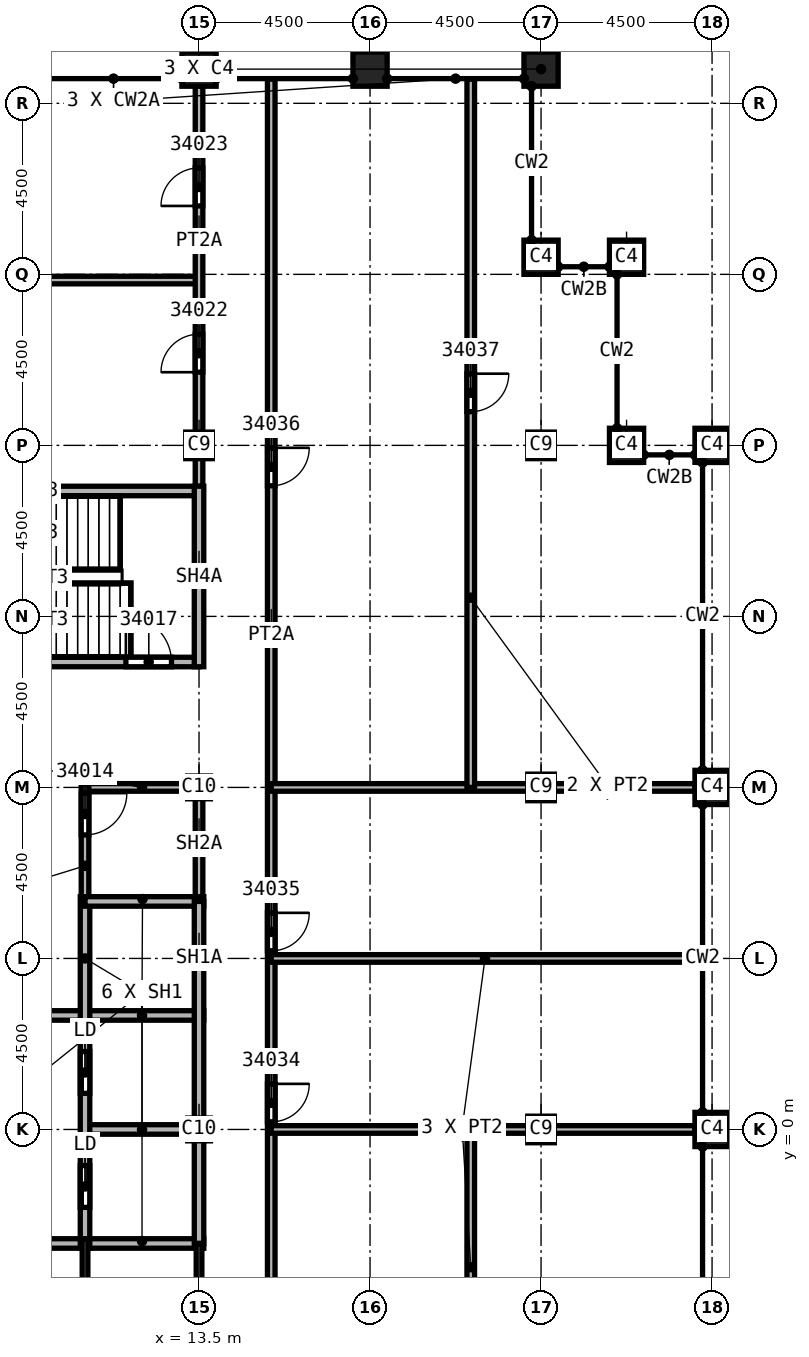
"""IFC4 building model, lengths in metres.
Left out: names, types, materials, properties, quantities, classifications, styles, units other than length and angle.
Written with IfcOpenShell. Run it as: python <this file> out.ifc"""

import sys

from ifc_helpers import new_model, si_unit, direction, frame, frame_2d, origin, origin_2d, place, context, subcontext, project, spatial, rectangle, extrude, element, fill, save


model = new_model("IFC4")
c1 = context("Model", 3, precision=1e-05, world=origin(), true_north=direction((0.0, 1.0)))
c2 = subcontext(c1, "Body", "Model", "MODEL_VIEW")
j1 = project(units=[si_unit("LENGTHUNIT", "METRE"), si_unit("PLANEANGLEUNIT", "RADIAN")], contexts=[c1])
p1 = place(None, origin())
s1 = spatial("IfcSite", under=j1, at=p1, CompositionType="ELEMENT")
p2 = place(p1, origin())
s2 = spatial("IfcBuilding", under=s1, at=p2, CompositionType="ELEMENT")
p3 = place(p2, frame((0.0, 0.0, 366.0)))
s3 = spatial("IfcBuildingStorey", under=s2, at=p3, CompositionType="ELEMENT", Elevation=366.0)
for number, where, z_axis, x_axis in (
    (1, (13.5, 18.0, 0.0), (0.0, 0.0, 1.0), (1.0, 0.0, 0.0)),
    (2, (22.5, 0.0, 0.0), (0.0, 0.0, 1.0), (1.0, 0.0, 0.0)),
    (3, (22.5, 9.0, 0.0), (0.0, 0.0, 1.0), (1.0, 0.0, 0.0)),
    (4, (22.5, 18.0, 0.0), (0.0, 0.0, 1.0), (1.0, 0.0, 0.0)),
):
    element("IfcColumn", number, at=place(p3, frame(where, z_axis=z_axis, x_axis=x_axis)), inside=s3, PredefinedType="COLUMN", context=c2, shape_type="SweptSolid", body=[
        extrude(rectangle(XDim=0.7, YDim=0.7, at=origin_2d()), origin(), (0.0, 0.0, 1.0), 9.6),
    ])
for number, where, z_axis, x_axis in (
    (5, (13.5, 0.0, 0.0), (0.0, 0.0, 1.0), (1.0, 0.0, 0.0)),
    (6, (13.5, 9.0, 0.0), (0.0, 0.0, 1.0), (1.0, 0.0, 0.0)),
):
    element("IfcColumn", number, at=place(p3, frame(where, z_axis=z_axis, x_axis=x_axis)), inside=s3, PredefinedType="COLUMN", context=c2, shape_type="SweptSolid", body=[
        extrude(rectangle(XDim=0.6, YDim=0.6, at=origin_2d()), origin(), (0.0, 0.0, 1.0), 9.6),
    ])
for number, where, z_axis, x_axis in (
    (7, (27.0, 0.0, 0.0), (0.0, 0.0, 1.0), (0.0, 1.0, 0.0)),
    (8, (27.0, 9.0, 0.0), (0.0, 0.0, 1.0), (0.0, 1.0, 0.0)),
    (9, (27.0, 18.0, 0.0), (0.0, 0.0, 1.0), (0.0, 1.0, 0.0)),
    (10, (13.5, 27.9, 0.0), (0.0, 0.0, 1.0), (1.0, 0.0, 0.0)),
    (11, (18.0, 27.9, 0.0), (0.0, 0.0, 1.0), (1.0, 0.0, 0.0)),
    (12, (22.5, 27.9, 0.0), (0.0, 0.0, 1.0), (1.0, 0.0, 0.0)),
    (13, (22.5, 22.95, 0.0), (0.0, 0.0, 1.0), (1.0, 0.0, 0.0)),
    (14, (24.75, 22.95, 0.0), (0.0, 0.0, 1.0), (1.0, 0.0, 0.0)),
    (15, (24.75, 18.0, 0.0), (0.0, 0.0, 1.0), (1.0, 0.0, 0.0)),
):
    element("IfcColumn", number, at=place(p3, frame(where, z_axis=z_axis, x_axis=x_axis)), inside=s3, PredefinedType="COLUMN", context=c2, shape_type="SweptSolid", body=[
        extrude(rectangle(XDim=0.9, YDim=0.9, at=origin_2d()), origin(), (0.0, 0.0, 1.0), 9.6),
    ])
p4 = place(p3, frame((3.0, 22.35, 0.0), z_axis=(0.0, 0.0, 1.0), x_axis=(1.0, 0.0, 0.0)))
e16 = element("IfcWall", 16, at=p4, inside=s3, PredefinedType="PARTITIONING", context=c2, shape_type="SweptSolid", body=[
    extrude(rectangle(XDim=10.5, YDim=0.2, at=frame_2d((5.25, 0.0))), origin(), (0.0, 0.0, 1.0), 9.15),
])
p5 = place(p3, frame((13.5, 16.675, 0.0), z_axis=(0.0, 0.0, 1.0), x_axis=(0.0, 1.0, 0.0)))
e17 = element("IfcWall", 17, at=p5, inside=s3, PredefinedType="PARTITIONING", context=c2, shape_type="SweptSolid", body=[
    extrude(rectangle(XDim=10.775, YDim=0.2, at=frame_2d((5.387, 0.0))), origin(), (0.0, 0.0, 1.0), 5.76),
])
p6 = place(p5, frame((3.25, 0.0, 0.0)))
e18 = element("IfcOpeningElement", 18, at=p6, cuts=e17, PredefinedType="OPENING", context=c2, shape_type="SweptSolid", body=[
    extrude(rectangle(XDim=1.0, YDim=2.1, at=frame_2d((0.5, 1.05))), frame((0.0, 0.1, 0.0), z_axis=(0.0, -1.0, 0.0), x_axis=(1.0, 0.0, 0.0)), (0.0, 0.0, 1.0), 0.2),
])
p7 = place(p5, frame((7.625, 0.0, 0.0)))
e19 = element("IfcOpeningElement", 19, at=p7, cuts=e17, PredefinedType="OPENING", context=c2, shape_type="SweptSolid", body=[
    extrude(rectangle(XDim=1.0, YDim=2.1, at=frame_2d((0.5, 1.05))), frame((0.0, 0.1, 0.0), z_axis=(0.0, -1.0, 0.0), x_axis=(1.0, 0.0, 0.0)), (0.0, 0.0, 1.0), 0.2),
])
p8 = place(p3, frame((15.4, 27.636, 0.0), z_axis=(0.0, 0.0, 1.0), x_axis=(0.0, -1.0, 0.0)))
e20 = element("IfcWall", 20, at=p8, inside=s3, PredefinedType="PARTITIONING", context=c2, shape_type="SweptSolid", body=[
    extrude(rectangle(XDim=55.086, YDim=0.2, at=frame_2d((27.543, 0.0))), origin(), (0.0, 0.0, 1.0), 5.76),
])
p9 = place(p8, frame((26.436, 0.0, 0.0)))
e21 = element("IfcOpeningElement", 21, at=p9, cuts=e20, PredefinedType="OPENING", context=c2, shape_type="SweptSolid", body=[
    extrude(rectangle(XDim=1.0, YDim=2.1, at=frame_2d((0.5, 1.05))), frame((0.0, 0.1, 0.0), z_axis=(0.0, -1.0, 0.0), x_axis=(1.0, 0.0, 0.0)), (0.0, 0.0, 1.0), 0.2),
])
p10 = place(p8, frame((21.936, 0.0, 0.0)))
e22 = element("IfcOpeningElement", 22, at=p10, cuts=e20, PredefinedType="OPENING", context=c2, shape_type="SweptSolid", body=[
    extrude(rectangle(XDim=1.0, YDim=2.1, at=frame_2d((0.5, 1.05))), frame((0.0, 0.1, 0.0), z_axis=(0.0, -1.0, 0.0), x_axis=(1.0, 0.0, 0.0)), (0.0, 0.0, 1.0), 0.2),
])
p11 = place(p8, frame((9.7, 0.0, 0.0)))
e23 = element("IfcOpeningElement", 23, at=p11, cuts=e20, PredefinedType="OPENING", context=c2, shape_type="SweptSolid", body=[
    extrude(rectangle(XDim=1.0, YDim=2.1, at=frame_2d((0.5, 1.05))), frame((0.0, 0.1, 0.0), z_axis=(0.0, -1.0, 0.0), x_axis=(1.0, 0.0, 0.0)), (0.0, 0.0, 1.0), 0.2),
])
p12 = place(p8, frame((49.986, 0.0, 0.0)))
e24 = element("IfcOpeningElement", 24, at=p12, cuts=e20, PredefinedType="OPENING", context=c2, shape_type="SweptSolid", body=[
    extrude(rectangle(XDim=1.0, YDim=2.1, at=frame_2d((0.5, 1.05))), frame((0.0, 0.1, 0.0), z_axis=(0.0, -1.0, 0.0), x_axis=(1.0, 0.0, 0.0)), (0.0, 0.0, 1.0), 0.2),
])
p13 = place(p8, frame((44.661, 0.0, 0.0)))
e25 = element("IfcOpeningElement", 25, at=p13, cuts=e20, PredefinedType="OPENING", context=c2, shape_type="SweptSolid", body=[
    extrude(rectangle(XDim=1.0, YDim=2.1, at=frame_2d((0.5, 1.05))), frame((0.0, 0.1, 0.0), z_axis=(0.0, -1.0, 0.0), x_axis=(1.0, 0.0, 0.0)), (0.0, 0.0, 1.0), 0.2),
])
p14 = place(p8, frame((41.286, 0.0, 0.0)))
e26 = element("IfcOpeningElement", 26, at=p14, cuts=e20, PredefinedType="OPENING", context=c2, shape_type="SweptSolid", body=[
    extrude(rectangle(XDim=1.0, YDim=2.1, at=frame_2d((0.5, 1.05))), frame((0.0, 0.1, 0.0), z_axis=(0.0, -1.0, 0.0), x_axis=(1.0, 0.0, 0.0)), (0.0, 0.0, 1.0), 0.2),
])
p15 = place(p8, frame((36.636, 0.0, 0.0)))
e27 = element("IfcOpeningElement", 27, at=p15, cuts=e20, PredefinedType="OPENING", context=c2, shape_type="SweptSolid", body=[
    extrude(rectangle(XDim=1.0, YDim=2.1, at=frame_2d((0.5, 1.05))), frame((0.0, 0.1, 0.0), z_axis=(0.0, -1.0, 0.0), x_axis=(1.0, 0.0, 0.0)), (0.0, 0.0, 1.0), 0.2),
])
for number, where, z_axis, x_axis in (
    (28, (15.4, 4.5, 0.0), (0.0, 0.0, 1.0), (1.0, 0.0, 0.0)),
    (29, (15.4, 9.0, 0.0), (0.0, 0.0, 1.0), (1.0, 0.0, 0.0)),
):
    element("IfcWall", number, at=place(p3, frame(where, z_axis=z_axis, x_axis=x_axis)), inside=s3, PredefinedType="PARTITIONING", context=c2, shape_type="SweptSolid", body=[
        extrude(rectangle(XDim=11.15, YDim=0.2, at=frame_2d((5.575, 0.0))), origin(), (0.0, 0.0, 1.0), 9.15),
    ])
p16 = place(p3, frame((20.65, 0.0, 0.0), z_axis=(0.0, 0.0, 1.0), x_axis=(0.0, -1.0, 0.0)))
e30 = element("IfcWall", 30, at=p16, inside=s3, PredefinedType="PARTITIONING", context=c2, shape_type="SweptSolid", body=[
    extrude(rectangle(XDim=13.5, YDim=0.2, at=frame_2d((6.75, 0.0))), origin(), (0.0, 0.0, 1.0), 9.15),
])
p17 = place(p16, frame((7.15, 0.0, 0.0)))
e31 = element("IfcOpeningElement", 31, at=p17, cuts=e30, PredefinedType="OPENING", context=c2, shape_type="SweptSolid", body=[
    extrude(rectangle(XDim=1.0, YDim=2.1, at=frame_2d((0.5, 1.05))), frame((0.0, 0.1, 0.0), z_axis=(0.0, -1.0, 0.0), x_axis=(1.0, 0.0, 0.0)), (0.0, 0.0, 1.0), 0.2),
])
p18 = place(p3, frame((20.65, 27.636, 0.0), z_axis=(0.0, 0.0, 1.0), x_axis=(0.0, -1.0, 0.0)))
e32 = element("IfcWall", 32, at=p18, inside=s3, PredefinedType="PARTITIONING", context=c2, shape_type="SweptSolid", body=[
    extrude(rectangle(XDim=18.636, YDim=0.2, at=frame_2d((9.318, 0.0))), origin(), (0.0, 0.0, 1.0), 9.15),
])
p19 = place(p18, frame((7.75, 0.0, 0.0)))
e33 = element("IfcOpeningElement", 33, at=p19, cuts=e32, PredefinedType="OPENING", context=c2, shape_type="SweptSolid", body=[
    extrude(rectangle(XDim=1.0, YDim=2.1, at=frame_2d((0.5, 1.05))), frame((0.0, 0.1, 0.0), z_axis=(0.0, -1.0, 0.0), x_axis=(1.0, 0.0, 0.0)), (0.0, 0.0, 1.0), 0.2),
])
p20 = place(p3, frame((26.55, 0.0, 0.0), z_axis=(0.0, 0.0, 1.0), x_axis=(-1.0, 0.0, 0.0)))
e34 = element("IfcWall", 34, at=p20, inside=s3, PredefinedType="PARTITIONING", context=c2, shape_type="SweptSolid", body=[
    extrude(rectangle(XDim=11.15, YDim=0.2, at=frame_2d((5.575, 0.0))), origin(), (0.0, 0.0, 1.0), 9.15),
])
p21 = place(p3, frame((10.5, 9.0, 0.0), z_axis=(0.0, 0.0, 1.0), x_axis=(1.0, 0.0, 0.0)))
e35 = element("IfcWall", 35, at=p21, inside=s3, PredefinedType="SOLIDWALL", context=c2, shape_type="SweptSolid", body=[
    extrude(rectangle(XDim=3.0, YDim=0.2, at=frame_2d((1.5, 0.0))), origin(), (0.0, 0.0, 1.0), 8.838),
])
p22 = place(p3, frame((10.5, 9.1, 0.0), z_axis=(0.0, 0.0, 1.0), x_axis=(0.0, -1.0, 0.0)))
e36 = element("IfcWall", 36, at=p22, inside=s3, PredefinedType="SOLIDWALL", context=c2, shape_type="SweptSolid", body=[
    extrude(rectangle(XDim=3.225, YDim=0.2, at=frame_2d((1.613, 0.0))), origin(), (0.0, 0.0, 1.0), 9.15),
])
p23 = place(p22, frame((0.25, 0.0, 0.0)))
e37 = element("IfcOpeningElement", 37, at=p23, cuts=e36, PredefinedType="OPENING", context=c2, shape_type="SweptSolid", body=[
    extrude(rectangle(XDim=1.1, YDim=2.1, at=frame_2d((0.55, 1.05))), frame((0.0, 0.1, 0.0), z_axis=(0.0, -1.0, 0.0), x_axis=(1.0, 0.0, 0.0)), (0.0, 0.0, 1.0), 0.2),
])
p24 = place(p3, frame((13.5, 9.1, 0.0), z_axis=(0.0, 0.0, 1.0), x_axis=(0.0, -1.0, 0.0)))
e38 = element("IfcWall", 38, at=p24, inside=s3, PredefinedType="SOLIDWALL", context=c2, shape_type="SweptSolid", body=[
    extrude(rectangle(XDim=3.1, YDim=0.2, at=frame_2d((1.55, 0.0))), origin(), (0.0, 0.0, 1.0), 5.76),
])
p25 = place(p3, frame((7.5, -3.0, 0.0), z_axis=(0.0, 0.0, 1.0), x_axis=(1.0, 0.0, 0.0)))
e39 = element("IfcWall", 39, at=p25, inside=s3, PredefinedType="SOLIDWALL", context=c2, shape_type="SweptSolid", body=[
    extrude(rectangle(XDim=6.125, YDim=0.25, at=frame_2d((3.062, 0.0))), origin(), (0.0, 0.0, 1.0), 9.15),
])
p26 = place(p25, frame((0.25, 0.0, 0.0)))
e40 = element("IfcOpeningElement", 40, at=p26, cuts=e39, PredefinedType="OPENING", context=c2, shape_type="SweptSolid", body=[
    extrude(rectangle(XDim=1.1, YDim=2.1, at=frame_2d((0.55, 1.05))), frame((0.0, 0.125, 0.0), z_axis=(0.0, -1.0, 0.0), x_axis=(1.0, 0.0, 0.0)), (0.0, 0.0, 1.0), 0.25),
])
p27 = place(p3, frame((7.5, 3.0, 0.0), z_axis=(0.0, 0.0, 1.0), x_axis=(1.0, 0.0, 0.0)))
e41 = element("IfcWall", 41, at=p27, inside=s3, PredefinedType="SOLIDWALL", context=c2, shape_type="SweptSolid", body=[
    extrude(rectangle(XDim=6.125, YDim=0.25, at=frame_2d((3.062, 0.0))), origin(), (0.0, 0.0, 1.0), 9.15),
])
p28 = place(p27, frame((0.25, 0.0, 0.0)))
e42 = element("IfcOpeningElement", 42, at=p28, cuts=e41, PredefinedType="OPENING", context=c2, shape_type="SweptSolid", body=[
    extrude(rectangle(XDim=1.1, YDim=2.1, at=frame_2d((0.55, 1.05))), frame((0.0, 0.125, 0.0), z_axis=(0.0, -1.0, 0.0), x_axis=(1.0, 0.0, 0.0)), (0.0, 0.0, 1.0), 0.25),
])
p29 = place(p3, frame((10.5, 0.0, 0.0), z_axis=(0.0, 0.0, 1.0), x_axis=(1.0, 0.0, 0.0)))
e43 = element("IfcWall", 43, at=p29, inside=s3, PredefinedType="SOLIDWALL", context=c2, shape_type="SweptSolid", body=[
    extrude(rectangle(XDim=3.125, YDim=0.25, at=frame_2d((1.562, 0.0))), origin(), (0.0, 0.0, 1.0), 9.15),
])
p30 = place(p3, frame((10.5, 6.125, 0.0), z_axis=(0.0, 0.0, 1.0), x_axis=(0.0, -1.0, 0.0)))
e44 = element("IfcWall", 44, at=p30, inside=s3, PredefinedType="SOLIDWALL", context=c2, shape_type="SweptSolid", body=[
    extrude(rectangle(XDim=9.25, YDim=0.25, at=frame_2d((4.625, 0.0))), origin(), (0.0, 0.0, 1.0), 9.15),
])
p31 = place(p30, frame((7.075, 0.0, 0.0)))
e45 = element("IfcOpeningElement", 45, at=p31, cuts=e44, PredefinedType="OPENING", context=c2, shape_type="SweptSolid", body=[
    extrude(rectangle(XDim=1.1, YDim=2.1, at=frame_2d((0.55, 1.05))), frame((0.0, 0.125, 0.0), z_axis=(0.0, -1.0, 0.0), x_axis=(1.0, 0.0, 0.0)), (0.0, 0.0, 1.0), 0.25),
])
p32 = place(p30, frame((4.075, 0.0, 0.0)))
e46 = element("IfcOpeningElement", 46, at=p32, cuts=e44, PredefinedType="OPENING", context=c2, shape_type="SweptSolid", body=[
    extrude(rectangle(XDim=1.1, YDim=2.1, at=frame_2d((0.55, 1.05))), frame((0.0, 0.125, 0.0), z_axis=(0.0, -1.0, 0.0), x_axis=(1.0, 0.0, 0.0)), (0.0, 0.0, 1.0), 0.25),
])
p33 = place(p3, frame((10.5, 6.0, 0.0), z_axis=(0.0, 0.0, 1.0), x_axis=(1.0, 0.0, 0.0)))
e47 = element("IfcWall", 47, at=p33, inside=s3, PredefinedType="SOLIDWALL", context=c2, shape_type="SweptSolid", body=[
    extrude(rectangle(XDim=3.125, YDim=0.25, at=frame_2d((1.562, 0.0))), origin(), (0.0, 0.0, 1.0), 9.15),
])
p34 = place(p3, frame((13.5, 6.0, 0.0), z_axis=(0.0, 0.0, 1.0), x_axis=(0.0, -1.0, 0.0)))
e48 = element("IfcWall", 48, at=p34, inside=s3, PredefinedType="SOLIDWALL", context=c2, shape_type="SweptSolid", body=[
    extrude(rectangle(XDim=9.0, YDim=0.25, at=frame_2d((4.5, 0.0))), origin(), (0.0, 0.0, 1.0), 5.76),
])
p35 = place(p3, frame((4.375, 12.3, 0.0), z_axis=(0.0, 0.0, 1.0), x_axis=(1.0, 0.0, 0.0)))
e49 = element("IfcWall", 49, at=p35, inside=s3, PredefinedType="SOLIDWALL", context=c2, shape_type="SweptSolid", body=[
    extrude(rectangle(XDim=9.125, YDim=0.25, at=frame_2d((4.562, 0.0))), origin(), (0.0, 0.0, 1.0), 9.15),
])
p36 = place(p35, frame((7.2, 0.0, 0.0)))
e50 = element("IfcOpeningElement", 50, at=p36, cuts=e49, PredefinedType="OPENING", context=c2, shape_type="SweptSolid", body=[
    extrude(rectangle(XDim=1.2, YDim=2.1, at=frame_2d((0.6, 1.05))), frame((0.0, 0.125, 0.0), z_axis=(0.0, -1.0, 0.0), x_axis=(1.0, 0.0, 0.0)), (0.0, 0.0, 1.0), 0.25),
])
p37 = place(p3, frame((4.4, 16.8, 0.0), z_axis=(0.0, 0.0, 1.0), x_axis=(1.0, 0.0, 0.0)))
e51 = element("IfcWall", 51, at=p37, inside=s3, PredefinedType="SOLIDWALL", context=c2, shape_type="SweptSolid", body=[
    extrude(rectangle(XDim=9.1, YDim=0.25, at=frame_2d((4.55, 0.0))), origin(), (0.0, 0.0, 1.0), 9.15),
])
p38 = place(p3, frame((13.5, 12.175, 0.0), z_axis=(0.0, 0.0, 1.0), x_axis=(0.0, 1.0, 0.0)))
e52 = element("IfcWall", 52, at=p38, inside=s3, PredefinedType="SOLIDWALL", context=c2, shape_type="SweptSolid", body=[
    extrude(rectangle(XDim=4.75, YDim=0.25, at=frame_2d((2.375, 0.0))), origin(), (0.0, 0.0, 1.0), 5.76),
])
p39 = place(p3, frame((10.5, -2.875, 0.0), z_axis=(0.0, 0.0, 1.0), x_axis=(0.0, -1.0, 0.0)))
e53 = element("IfcWall", 53, at=p39, inside=s3, PredefinedType="PARTITIONING", context=c2, shape_type="SweptSolid", body=[
    extrude(rectangle(XDim=6.2, YDim=0.15, at=frame_2d((3.1, 0.0))), origin(), (0.0, 0.0, 1.0), 9.15),
])
p40 = place(p39, frame((2.65, 0.0, 0.0)))
e54 = element("IfcOpeningElement", 54, at=p40, cuts=e53, PredefinedType="OPENING", context=c2, shape_type="SweptSolid", body=[
    extrude(rectangle(XDim=0.9, YDim=2.1, at=frame_2d((0.45, 1.05))), frame((0.0, 0.075, 0.0), z_axis=(0.0, -1.0, 0.0), x_axis=(1.0, 0.0, 0.0)), (0.0, 0.0, 1.0), 0.15),
])
p41 = place(p3, frame((13.5, -3.0, 0.0), z_axis=(0.0, 0.0, 1.0), x_axis=(0.0, -1.0, 0.0)))
e55 = element("IfcWall", 55, at=p41, inside=s3, PredefinedType="PARTITIONING", context=c2, shape_type="SweptSolid", body=[
    extrude(rectangle(XDim=6.075, YDim=0.15, at=frame_2d((3.038, 0.0))), origin(), (0.0, 0.0, 1.0), 5.76),
])
p42 = place(p23, origin())
e56 = element("IfcDoor", 56, at=p42, inside=s3, OperationType="SINGLE_SWING_LEFT", PredefinedType="DOOR", context=c2, shape_type="SweptSolid", body=[
    extrude(rectangle(XDim=1.1, YDim=2.1, at=frame_2d((0.55, 1.05))), frame((0.0, 0.025, 0.0), z_axis=(0.0, -1.0, 0.0), x_axis=(1.0, 0.0, 0.0)), (0.0, 0.0, 1.0), 0.05),
])
fill(e37, e56)
p43 = place(p36, origin())
e57 = element("IfcDoor", 57, at=p43, inside=s3, OperationType="SINGLE_SWING_RIGHT", PredefinedType="DOOR", context=c2, shape_type="SweptSolid", body=[
    extrude(rectangle(XDim=1.2, YDim=2.1, at=frame_2d((0.6, 1.05))), frame((0.0, 0.025, 0.0), z_axis=(0.0, -1.0, 0.0), x_axis=(1.0, 0.0, 0.0)), (0.0, 0.0, 1.0), 0.05),
])
fill(e50, e57)
p44 = place(p6, origin())
e58 = element("IfcDoor", 58, at=p44, inside=s3, OperationType="SINGLE_SWING_LEFT", PredefinedType="DOOR", context=c2, shape_type="SweptSolid", body=[
    extrude(rectangle(XDim=1.0, YDim=2.1, at=frame_2d((0.5, 1.05))), frame((0.0, 0.025, 0.0), z_axis=(0.0, -1.0, 0.0), x_axis=(1.0, 0.0, 0.0)), (0.0, 0.0, 1.0), 0.05),
])
fill(e18, e58)
p45 = place(p7, origin())
e59 = element("IfcDoor", 59, at=p45, inside=s3, OperationType="SINGLE_SWING_RIGHT", PredefinedType="DOOR", context=c2, shape_type="SweptSolid", body=[
    extrude(rectangle(XDim=1.0, YDim=2.1, at=frame_2d((0.5, 1.05))), frame((0.0, 0.025, 0.0), z_axis=(0.0, -1.0, 0.0), x_axis=(1.0, 0.0, 0.0)), (0.0, 0.0, 1.0), 0.05),
])
fill(e19, e59)
p46 = place(p9, origin())
e60 = element("IfcDoor", 60, at=p46, inside=s3, OperationType="SINGLE_SWING_LEFT", PredefinedType="DOOR", context=c2, shape_type="SweptSolid", body=[
    extrude(rectangle(XDim=1.0, YDim=2.1, at=frame_2d((0.5, 1.05))), frame((0.0, 0.025, 0.0), z_axis=(0.0, -1.0, 0.0), x_axis=(1.0, 0.0, 0.0)), (0.0, 0.0, 1.0), 0.05),
])
fill(e21, e60)
p47 = place(p10, origin())
e61 = element("IfcDoor", 61, at=p47, inside=s3, OperationType="SINGLE_SWING_RIGHT", PredefinedType="DOOR", context=c2, shape_type="SweptSolid", body=[
    extrude(rectangle(XDim=1.0, YDim=2.1, at=frame_2d((0.5, 1.05))), frame((0.0, 0.025, 0.0), z_axis=(0.0, -1.0, 0.0), x_axis=(1.0, 0.0, 0.0)), (0.0, 0.0, 1.0), 0.05),
])
fill(e22, e61)
p48 = place(p11, origin())
e62 = element("IfcDoor", 62, at=p48, inside=s3, OperationType="SINGLE_SWING_LEFT", PredefinedType="DOOR", context=c2, shape_type="SweptSolid", body=[
    extrude(rectangle(XDim=1.0, YDim=2.1, at=frame_2d((0.5, 1.05))), frame((0.0, 0.025, 0.0), z_axis=(0.0, -1.0, 0.0), x_axis=(1.0, 0.0, 0.0)), (0.0, 0.0, 1.0), 0.05),
])
fill(e23, e62)
p49 = place(p19, origin())
e63 = element("IfcDoor", 63, at=p49, inside=s3, OperationType="SINGLE_SWING_RIGHT", PredefinedType="DOOR", context=c2, shape_type="SweptSolid", body=[
    extrude(rectangle(XDim=1.0, YDim=2.1, at=frame_2d((0.5, 1.05))), frame((0.0, 0.025, 0.0), z_axis=(0.0, -1.0, 0.0), x_axis=(1.0, 0.0, 0.0)), (0.0, 0.0, 1.0), 0.05),
])
fill(e33, e63)
p50 = place(p31, origin())
e64 = element("IfcDoor", 64, at=p50, inside=s3, OperationType="SLIDING_TO_LEFT", PredefinedType="DOOR", context=c2, shape_type="SweptSolid", body=[
    extrude(rectangle(XDim=1.1, YDim=2.1, at=frame_2d((0.55, 1.05))), frame((0.0, 0.025, 0.0), z_axis=(0.0, -1.0, 0.0), x_axis=(1.0, 0.0, 0.0)), (0.0, 0.0, 1.0), 0.05),
])
fill(e45, e64)
p51 = place(p32, origin())
e65 = element("IfcDoor", 65, at=p51, inside=s3, OperationType="SLIDING_TO_LEFT", PredefinedType="DOOR", context=c2, shape_type="SweptSolid", body=[
    extrude(rectangle(XDim=1.1, YDim=2.1, at=frame_2d((0.55, 1.05))), frame((0.0, 0.025, 0.0), z_axis=(0.0, -1.0, 0.0), x_axis=(1.0, 0.0, 0.0)), (0.0, 0.0, 1.0), 0.05),
])
fill(e46, e65)
save(model, sys.argv[1])
